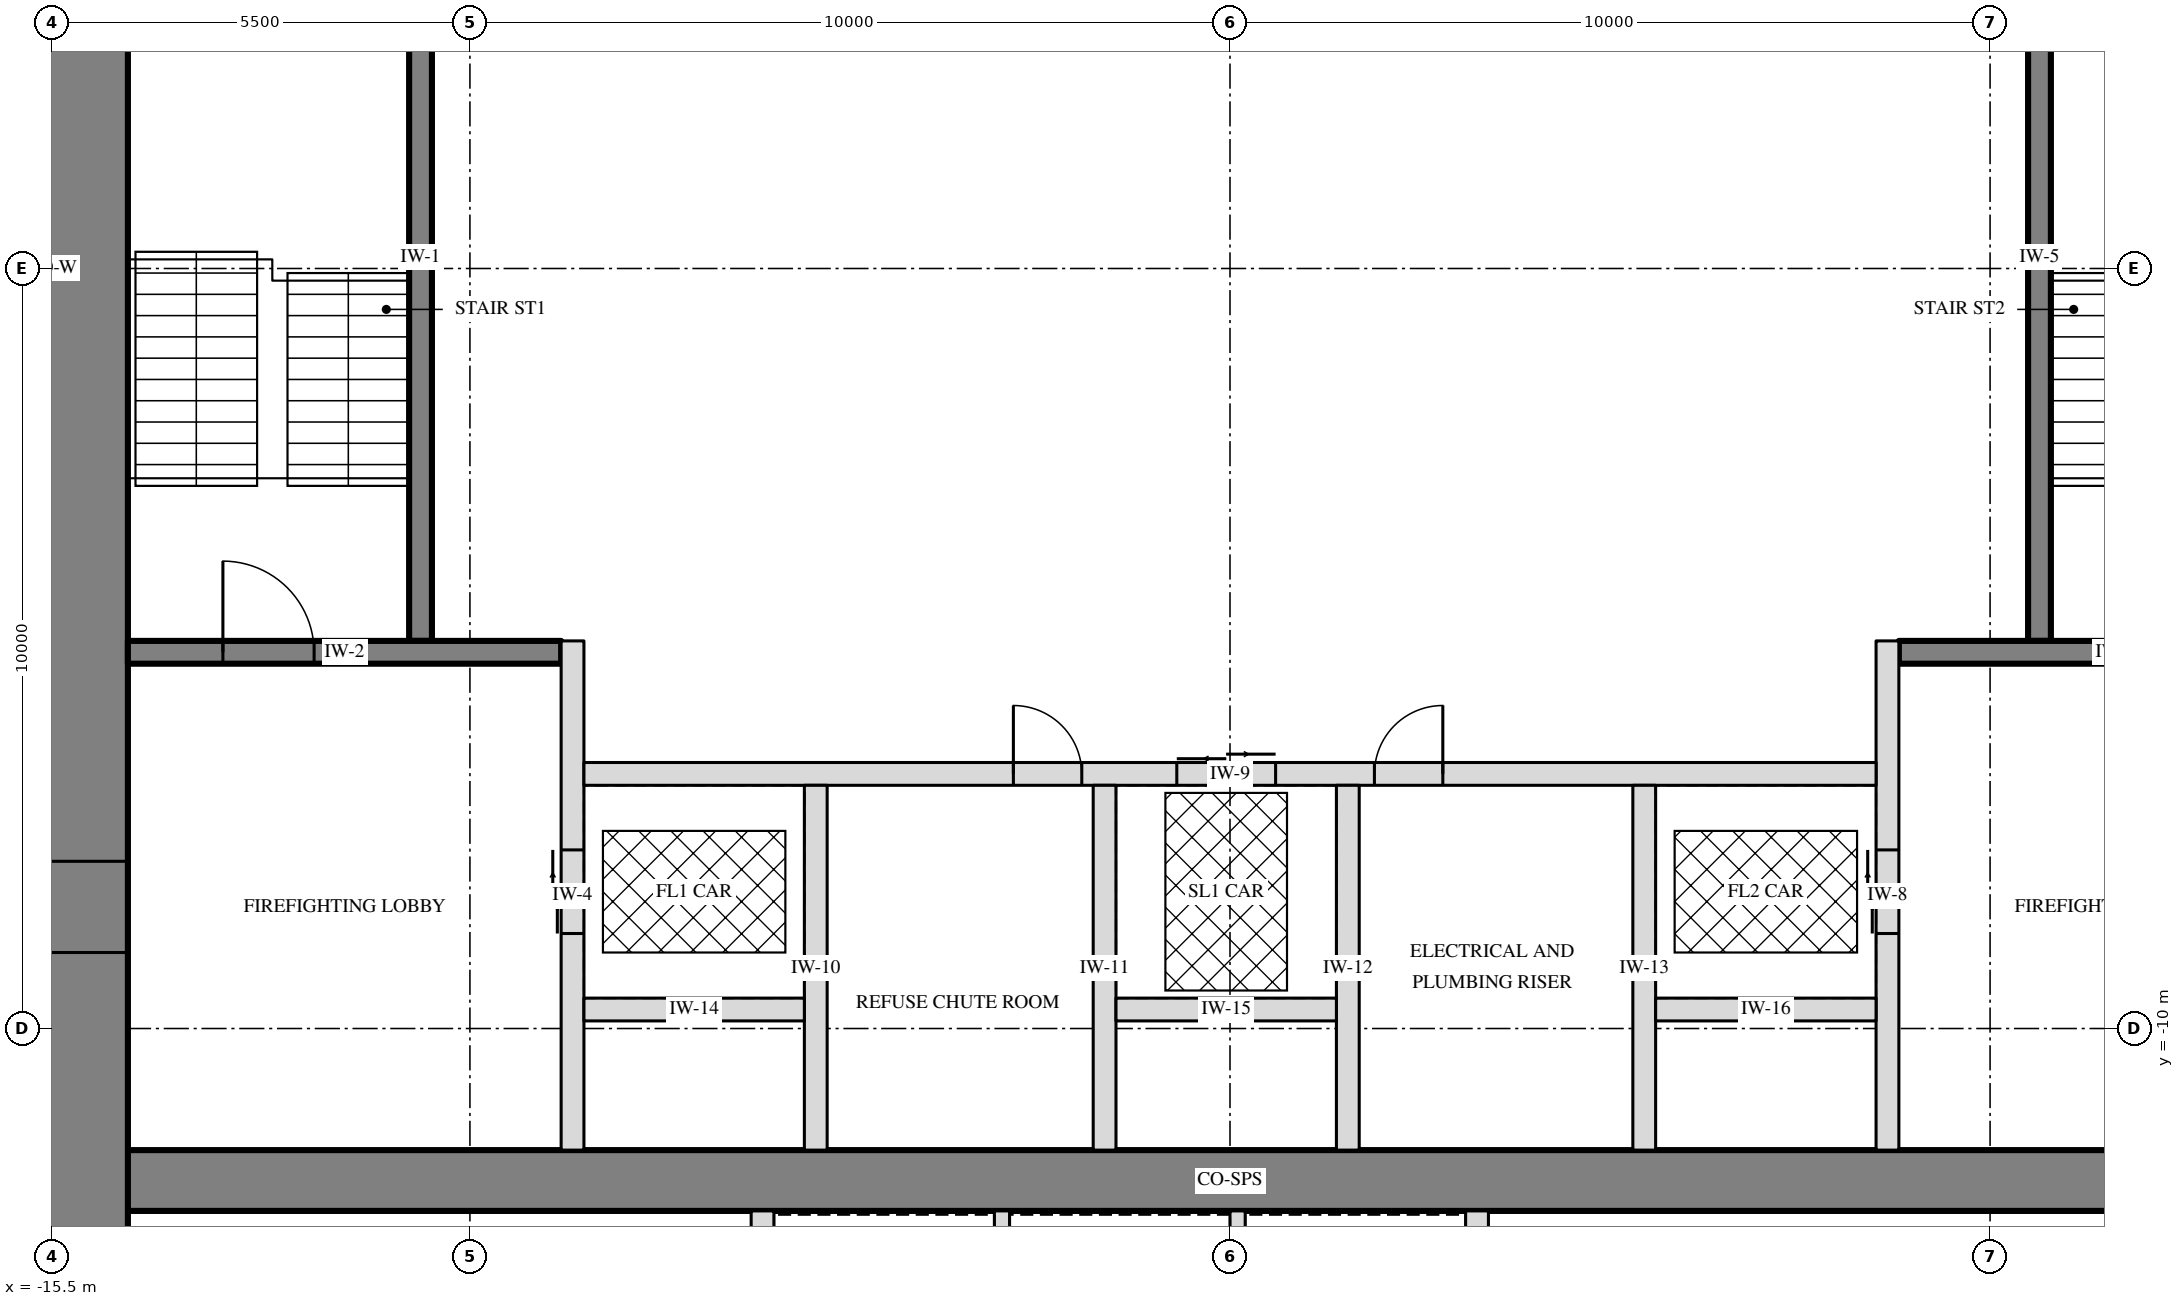
"""IFC4 building model, lengths in metres.
Left out: names, types, materials, properties, quantities, classifications, styles, units other than length and angle.
Written with IfcOpenShell. Run it as: python <this file> out.ifc"""

import sys

from ifc_helpers import new_model, si_unit, direction, frame, frame_2d, origin, place, context, subcontext, project, spatial, rectangle, extrude, element, fill, save


model = new_model("IFC4")
c1 = context("Model", 3, precision=1e-05, world=origin(), true_north=direction((0.0, 1.0)))
c2 = subcontext(c1, "Body", "Model", "MODEL_VIEW")
j1 = project(units=[si_unit("LENGTHUNIT", "METRE"), si_unit("PLANEANGLEUNIT", "RADIAN")], contexts=[c1])
p1 = place(None, origin())
s1 = spatial("IfcSite", under=j1, at=p1, CompositionType="ELEMENT")
p2 = place(p1, origin())
s2 = spatial("IfcBuilding", under=s1, at=p2, CompositionType="ELEMENT")
p3 = place(p2, frame((0.0, 0.0, 21.0)))
s3 = spatial("IfcBuildingStorey", under=s2, at=p3, CompositionType="ELEMENT", Elevation=21.0)
p4 = place(p3, frame((-15.5, -12.0, -0.25), z_axis=(0.0, 0.0, 1.0), x_axis=(1.0, 0.0, 0.0)))
e1 = element("IfcWall", 1, at=p4, inside=s3, PredefinedType="SHEAR", context=c2, shape_type="SweptSolid", body=[
    extrude(rectangle(XDim=31.0, YDim=0.8, at=frame_2d((15.5, 0.0))), origin(), (0.0, 0.0, 1.0), 3.75),
])
p5 = place(p3, frame((-15.5, -15.5, -0.25), z_axis=(0.0, 0.0, 1.0), x_axis=(0.0, 1.0, 0.0)))
e2 = element("IfcWall", 2, at=p5, inside=s3, PredefinedType="SHEAR", context=c2, shape_type="SweptSolid", body=[
    extrude(rectangle(XDim=31.0, YDim=2.0, at=frame_2d((15.5, 0.0))), origin(), (0.0, 0.0, 1.0), 3.75),
])
p6 = place(p5, frame((6.5, 0.0, 0.25)))
e3 = element("IfcOpeningElement", 3, at=p6, cuts=e2, PredefinedType="OPENING", context=c2, shape_type="SweptSolid", body=[
    extrude(rectangle(XDim=1.2, YDim=2.1, at=frame_2d((0.6, 1.05))), frame((0.0, 1.01, 0.0), z_axis=(0.0, -1.0, 0.0), x_axis=(1.0, 0.0, 0.0)), (0.0, 0.0, 1.0), 2.02),
])
p7 = place(p5, frame((23.0, 0.0, 0.25)))
e4 = element("IfcOpeningElement", 4, at=p7, cuts=e2, PredefinedType="OPENING", context=c2, shape_type="SweptSolid", body=[
    extrude(rectangle(XDim=1.8, YDim=2.1, at=frame_2d((0.9, 1.05))), frame((0.0, 1.01, 0.0), z_axis=(0.0, -1.0, 0.0), x_axis=(1.0, 0.0, 0.0)), (0.0, 0.0, 1.0), 2.02),
])
p8 = place(p3, frame((-10.65, -4.9, 0.0), z_axis=(0.0, 0.0, 1.0), x_axis=(0.0, 1.0, 0.0)))
e5 = element("IfcWall", 5, at=p8, inside=s3, PredefinedType="SOLIDWALL", context=c2, shape_type="SweptSolid", body=[
    extrude(rectangle(XDim=10.1, YDim=0.3, at=frame_2d((5.05, 0.0))), origin(), (0.0, 0.0, 1.0), 3.5),
])
p9 = place(p3, frame((-14.5, -5.05, 0.0), z_axis=(0.0, 0.0, 1.0), x_axis=(1.0, 0.0, 0.0)))
e6 = element("IfcWall", 6, at=p9, inside=s3, PredefinedType="SOLIDWALL", context=c2, shape_type="SweptSolid", body=[
    extrude(rectangle(XDim=5.7, YDim=0.3, at=frame_2d((2.85, 0.0))), origin(), (0.0, 0.0, 1.0), 3.5),
])
p10 = place(p9, frame((1.25, 0.0, 0.0)))
e7 = element("IfcOpeningElement", 7, at=p10, cuts=e6, PredefinedType="OPENING", context=c2, shape_type="SweptSolid", body=[
    extrude(rectangle(XDim=1.2, YDim=2.1, at=frame_2d((0.6, 1.05))), frame((0.0, 0.16, 0.0), z_axis=(0.0, -1.0, 0.0), x_axis=(1.0, 0.0, 0.0)), (0.0, 0.0, 1.0), 0.32),
])
p11 = place(p3, frame((-8.65, -11.6, 0.0), z_axis=(0.0, 0.0, 1.0), x_axis=(0.0, 1.0, 0.0)))
e8 = element("IfcWall", 8, at=p11, inside=s3, PredefinedType="PARTITIONING", context=c2, shape_type="SweptSolid", body=[
    extrude(rectangle(XDim=6.7, YDim=0.3, at=frame_2d((3.35, 0.0))), origin(), (0.0, 0.0, 1.0), 3.5),
])
p12 = place(p11, frame((2.85, 0.0, 0.0)))
e9 = element("IfcOpeningElement", 9, at=p12, cuts=e8, PredefinedType="OPENING", context=c2, shape_type="SweptSolid", body=[
    extrude(rectangle(XDim=1.1, YDim=2.1, at=frame_2d((0.55, 1.05))), frame((0.0, 0.16, 0.0), z_axis=(0.0, -1.0, 0.0), x_axis=(1.0, 0.0, 0.0)), (0.0, 0.0, 1.0), 0.32),
])
p13 = place(p3, frame((10.65, -4.9, 0.0), z_axis=(0.0, 0.0, 1.0), x_axis=(0.0, 1.0, 0.0)))
e10 = element("IfcWall", 10, at=p13, inside=s3, PredefinedType="SOLIDWALL", context=c2, shape_type="SweptSolid", body=[
    extrude(rectangle(XDim=10.1, YDim=0.3, at=frame_2d((5.05, 0.0))), origin(), (0.0, 0.0, 1.0), 3.5),
])
p14 = place(p3, frame((14.5, -5.05, 0.0), z_axis=(0.0, 0.0, 1.0), x_axis=(-1.0, 0.0, 0.0)))
e11 = element("IfcWall", 11, at=p14, inside=s3, PredefinedType="SOLIDWALL", context=c2, shape_type="SweptSolid", body=[
    extrude(rectangle(XDim=5.7, YDim=0.3, at=frame_2d((2.85, 0.0))), origin(), (0.0, 0.0, 1.0), 3.5),
])
p15 = place(p14, frame((1.25, 0.0, 0.0)))
e12 = element("IfcOpeningElement", 12, at=p15, cuts=e11, PredefinedType="OPENING", context=c2, shape_type="SweptSolid", body=[
    extrude(rectangle(XDim=1.2, YDim=2.1, at=frame_2d((0.6, 1.05))), frame((0.0, 0.16, 0.0), z_axis=(0.0, -1.0, 0.0), x_axis=(1.0, 0.0, 0.0)), (0.0, 0.0, 1.0), 0.32),
])
p16 = place(p3, frame((8.65, -11.6, 0.0), z_axis=(0.0, 0.0, 1.0), x_axis=(0.0, 1.0, 0.0)))
e13 = element("IfcWall", 13, at=p16, inside=s3, PredefinedType="PARTITIONING", context=c2, shape_type="SweptSolid", body=[
    extrude(rectangle(XDim=6.7, YDim=0.3, at=frame_2d((3.35, 0.0))), origin(), (0.0, 0.0, 1.0), 3.5),
])
p17 = place(p16, frame((2.85, 0.0, 0.0)))
e14 = element("IfcOpeningElement", 14, at=p17, cuts=e13, PredefinedType="OPENING", context=c2, shape_type="SweptSolid", body=[
    extrude(rectangle(XDim=1.1, YDim=2.1, at=frame_2d((0.55, 1.05))), frame((0.0, 0.16, 0.0), z_axis=(0.0, -1.0, 0.0), x_axis=(1.0, 0.0, 0.0)), (0.0, 0.0, 1.0), 0.32),
])
p18 = place(p3, frame((-8.5, -6.65, 0.0), z_axis=(0.0, 0.0, 1.0), x_axis=(1.0, 0.0, 0.0)))
e15 = element("IfcWall", 15, at=p18, inside=s3, PredefinedType="PARTITIONING", context=c2, shape_type="SweptSolid", body=[
    extrude(rectangle(XDim=17.0, YDim=0.3, at=frame_2d((8.5, 0.0))), origin(), (0.0, 0.0, 1.0), 3.5),
])
p19 = place(p18, frame((7.8, 0.0, 0.0)))
e16 = element("IfcOpeningElement", 16, at=p19, cuts=e15, PredefinedType="OPENING", context=c2, shape_type="SweptSolid", body=[
    extrude(rectangle(XDim=1.3, YDim=2.4, at=frame_2d((0.65, 1.2))), frame((0.0, 0.16, 0.0), z_axis=(0.0, -1.0, 0.0), x_axis=(1.0, 0.0, 0.0)), (0.0, 0.0, 1.0), 0.32),
])
p20 = place(p18, frame((5.65, 0.0, 0.0)))
e17 = element("IfcOpeningElement", 17, at=p20, cuts=e15, PredefinedType="OPENING", context=c2, shape_type="SweptSolid", body=[
    extrude(rectangle(XDim=0.9, YDim=2.1, at=frame_2d((0.45, 1.05))), frame((0.0, 0.16, 0.0), z_axis=(0.0, -1.0, 0.0), x_axis=(1.0, 0.0, 0.0)), (0.0, 0.0, 1.0), 0.32),
])
p21 = place(p18, frame((10.4, 0.0, 0.0)))
e18 = element("IfcOpeningElement", 18, at=p21, cuts=e15, PredefinedType="OPENING", context=c2, shape_type="SweptSolid", body=[
    extrude(rectangle(XDim=0.9, YDim=2.1, at=frame_2d((0.45, 1.05))), frame((0.0, 0.16, 0.0), z_axis=(0.0, -1.0, 0.0), x_axis=(1.0, 0.0, 0.0)), (0.0, 0.0, 1.0), 0.32),
])
for number, where, z_axis, x_axis in (
    (19, (-5.45, -11.6, 0.0), (0.0, 0.0, 1.0), (0.0, 1.0, 0.0)),
    (20, (-1.65, -11.6, 0.0), (0.0, 0.0, 1.0), (0.0, 1.0, 0.0)),
    (21, (1.55, -11.6, 0.0), (0.0, 0.0, 1.0), (0.0, 1.0, 0.0)),
    (22, (5.45, -11.6, 0.0), (0.0, 0.0, 1.0), (0.0, 1.0, 0.0)),
):
    element("IfcWall", number, at=place(p3, frame(where, z_axis=z_axis, x_axis=x_axis)), inside=s3, PredefinedType="PARTITIONING", context=c2, shape_type="SweptSolid", body=[
        extrude(rectangle(XDim=4.8, YDim=0.3, at=frame_2d((2.4, 0.0))), origin(), (0.0, 0.0, 1.0), 3.5),
    ])
for number, where, z_axis, x_axis in (
    (23, (-8.5, -9.75, 0.0), (0.0, 0.0, 1.0), (1.0, 0.0, 0.0)),
    (24, (-1.5, -9.75, 0.0), (0.0, 0.0, 1.0), (1.0, 0.0, 0.0)),
    (25, (5.6, -9.75, 0.0), (0.0, 0.0, 1.0), (1.0, 0.0, 0.0)),
):
    element("IfcWall", number, at=place(p3, frame(where, z_axis=z_axis, x_axis=x_axis)), inside=s3, PredefinedType="PARTITIONING", context=c2, shape_type="SweptSolid", body=[
        extrude(rectangle(XDim=2.9, YDim=0.3, at=frame_2d((1.45, 0.0))), origin(), (0.0, 0.0, 1.0), 3.5),
    ])
for number, where, z_axis, x_axis in (
    (26, (-6.15, -14.5, 0.0), (0.0, 0.0, 1.0), (0.0, 1.0, 0.0)),
    (27, (3.25, -14.5, 0.0), (0.0, 0.0, 1.0), (0.0, 1.0, 0.0)),
):
    element("IfcWall", number, at=place(p3, frame(where, z_axis=z_axis, x_axis=x_axis)), inside=s3, PredefinedType="PARTITIONING", context=c2, shape_type="SweptSolid", body=[
        extrude(rectangle(XDim=2.1, YDim=0.3, at=frame_2d((1.05, 0.0))), origin(), (0.0, 0.0, 1.0), 3.5),
    ])
for number, where, z_axis, x_axis in (
    (28, (-3.0, -14.5, 0.0), (0.0, 0.0, 1.0), (0.0, 1.0, 0.0)),
    (29, (0.1, -14.5, 0.0), (0.0, 0.0, 1.0), (0.0, 1.0, 0.0)),
):
    element("IfcWall", number, at=place(p3, frame(where, z_axis=z_axis, x_axis=x_axis)), inside=s3, PredefinedType="PARTITIONING", context=c2, shape_type="SweptSolid", body=[
        extrude(rectangle(XDim=2.1, YDim=0.2, at=frame_2d((1.05, 0.0))), origin(), (0.0, 0.0, 1.0), 3.5),
    ])
p22 = place(p3, frame((-10.65, 2.0, 0.0), z_axis=(0.0, 0.0, 1.0), x_axis=(1.0, 0.0, 0.0)))
e30 = element("IfcWall", 30, at=p22, inside=s3, PredefinedType="PARTITIONING", context=c2, shape_type="SweptSolid", body=[
    extrude(rectangle(XDim=21.3, YDim=0.3, at=frame_2d((10.65, 0.0))), origin(), (0.0, 0.0, 1.0), 3.5),
])
p23 = place(p22, frame((10.05, 0.0, 0.0)))
e31 = element("IfcOpeningElement", 31, at=p23, cuts=e30, PredefinedType="OPENING", context=c2, shape_type="SweptSolid", body=[
    extrude(rectangle(XDim=1.2, YDim=2.1, at=frame_2d((0.6, 1.05))), frame((0.0, 0.16, 0.0), z_axis=(0.0, -1.0, 0.0), x_axis=(1.0, 0.0, 0.0)), (0.0, 0.0, 1.0), 0.32),
])
p24 = place(p22, frame((18.942, 0.0, 0.0)))
e32 = element("IfcOpeningElement", 32, at=p24, cuts=e30, PredefinedType="OPENING", context=c2, shape_type="SweptSolid", body=[
    extrude(rectangle(XDim=0.9, YDim=2.1, at=frame_2d((0.45, 1.05))), frame((0.0, 0.16, 0.0), z_axis=(0.0, -1.0, 0.0), x_axis=(1.0, 0.0, 0.0)), (0.0, 0.0, 1.0), 0.32),
])
p25 = place(p3, frame((-3.3, -6.65, 0.0), z_axis=(0.0, 0.0, 1.0), x_axis=(0.0, 1.0, 0.0)))
e33 = element("IfcWall", 33, at=p25, inside=s3, PredefinedType="PARTITIONING", context=c2, shape_type="SweptSolid", body=[
    extrude(rectangle(XDim=8.65, YDim=0.3, at=frame_2d((4.325, 0.0))), origin(), (0.0, 0.0, 1.0), 3.5),
])
p26 = place(p25, frame((1.75, 0.0, 0.0)))
e34 = element("IfcOpeningElement", 34, at=p26, cuts=e33, PredefinedType="OPENING", context=c2, shape_type="SweptSolid", body=[
    extrude(rectangle(XDim=0.9, YDim=2.1, at=frame_2d((0.45, 1.05))), frame((0.0, 0.16, 0.0), z_axis=(0.0, -1.0, 0.0), x_axis=(1.0, 0.0, 0.0)), (0.0, 0.0, 1.0), 0.32),
])
p27 = place(p25, frame((6.075, 0.0, 0.0)))
e35 = element("IfcOpeningElement", 35, at=p27, cuts=e33, PredefinedType="OPENING", context=c2, shape_type="SweptSolid", body=[
    extrude(rectangle(XDim=0.9, YDim=2.1, at=frame_2d((0.45, 1.05))), frame((0.0, 0.16, 0.0), z_axis=(0.0, -1.0, 0.0), x_axis=(1.0, 0.0, 0.0)), (0.0, 0.0, 1.0), 0.32),
])
p28 = place(p3, frame((3.3, -6.65, 0.0), z_axis=(0.0, 0.0, 1.0), x_axis=(0.0, 1.0, 0.0)))
e36 = element("IfcWall", 36, at=p28, inside=s3, PredefinedType="PARTITIONING", context=c2, shape_type="SweptSolid", body=[
    extrude(rectangle(XDim=8.65, YDim=0.3, at=frame_2d((4.325, 0.0))), origin(), (0.0, 0.0, 1.0), 3.5),
])
p29 = place(p28, frame((3.875, 0.0, 0.0)))
e37 = element("IfcOpeningElement", 37, at=p29, cuts=e36, PredefinedType="OPENING", context=c2, shape_type="SweptSolid", body=[
    extrude(rectangle(XDim=0.9, YDim=2.1, at=frame_2d((0.45, 1.05))), frame((0.0, 0.16, 0.0), z_axis=(0.0, -1.0, 0.0), x_axis=(1.0, 0.0, 0.0)), (0.0, 0.0, 1.0), 0.32),
])
p30 = place(p3, frame((-10.65, -2.25, 0.0), z_axis=(0.0, 0.0, 1.0), x_axis=(1.0, 0.0, 0.0)))
e38 = element("IfcWall", 38, at=p30, inside=s3, PredefinedType="PARTITIONING", context=c2, shape_type="SweptSolid", body=[
    extrude(rectangle(XDim=7.35, YDim=0.3, at=frame_2d((3.675, 0.0))), origin(), (0.0, 0.0, 1.0), 3.5),
])
p31 = place(p3, frame((6.834, -6.65, 0.0), z_axis=(0.0, 0.0, 1.0), x_axis=(0.0, 1.0, 0.0)))
e39 = element("IfcWall", 39, at=p31, inside=s3, PredefinedType="PARTITIONING", context=c2, shape_type="SweptSolid", body=[
    extrude(rectangle(XDim=8.65, YDim=0.3, at=frame_2d((4.325, 0.0))), origin(), (0.0, 0.0, 1.0), 3.5),
])
p32 = place(p10, origin())
e40 = element("IfcDoor", 40, at=p32, inside=s3, OperationType="SINGLE_SWING_LEFT", PredefinedType="DOOR", context=c2, shape_type="SweptSolid", body=[
    extrude(rectangle(XDim=1.2, YDim=2.1, at=frame_2d((0.6, 1.05))), frame((0.0, 0.025, 0.0), z_axis=(0.0, -1.0, 0.0), x_axis=(1.0, 0.0, 0.0)), (0.0, 0.0, 1.0), 0.05),
])
fill(e7, e40)
p33 = place(p6, origin())
e41 = element("IfcDoor", 41, at=p33, inside=s3, OperationType="SINGLE_SWING_LEFT", PredefinedType="DOOR", context=c2, shape_type="SweptSolid", body=[
    extrude(rectangle(XDim=1.2, YDim=2.1, at=frame_2d((0.6, 1.05))), frame((0.0, 0.025, 0.0), z_axis=(0.0, -1.0, 0.0), x_axis=(1.0, 0.0, 0.0)), (0.0, 0.0, 1.0), 0.05),
])
fill(e3, e41)
p34 = place(p12, origin())
e42 = element("IfcDoor", 42, at=p34, inside=s3, OperationType="DOUBLE_DOOR_SLIDING", PredefinedType="DOOR", context=c2, shape_type="SweptSolid", body=[
    extrude(rectangle(XDim=1.1, YDim=2.1, at=frame_2d((0.55, 1.05))), frame((0.0, 0.025, 0.0), z_axis=(0.0, -1.0, 0.0), x_axis=(1.0, 0.0, 0.0)), (0.0, 0.0, 1.0), 0.05),
])
fill(e9, e42)
p35 = place(p17, origin())
e43 = element("IfcDoor", 43, at=p35, inside=s3, OperationType="DOUBLE_DOOR_SLIDING", PredefinedType="DOOR", context=c2, shape_type="SweptSolid", body=[
    extrude(rectangle(XDim=1.1, YDim=2.1, at=frame_2d((0.55, 1.05))), frame((0.0, 0.025, 0.0), z_axis=(0.0, -1.0, 0.0), x_axis=(1.0, 0.0, 0.0)), (0.0, 0.0, 1.0), 0.05),
])
fill(e14, e43)
p36 = place(p19, origin())
e44 = element("IfcDoor", 44, at=p36, inside=s3, OperationType="DOUBLE_DOOR_SLIDING", PredefinedType="DOOR", context=c2, shape_type="SweptSolid", body=[
    extrude(rectangle(XDim=1.3, YDim=2.4, at=frame_2d((0.65, 1.2))), frame((0.0, 0.025, 0.0), z_axis=(0.0, -1.0, 0.0), x_axis=(1.0, 0.0, 0.0)), (0.0, 0.0, 1.0), 0.05),
])
fill(e16, e44)
p37 = place(p23, origin())
e45 = element("IfcDoor", 45, at=p37, inside=s3, OperationType="SINGLE_SWING_LEFT", PredefinedType="DOOR", context=c2, shape_type="SweptSolid", body=[
    extrude(rectangle(XDim=1.2, YDim=2.1, at=frame_2d((0.6, 1.05))), frame((0.0, 0.025, 0.0), z_axis=(0.0, -1.0, 0.0), x_axis=(1.0, 0.0, 0.0)), (0.0, 0.0, 1.0), 0.05),
])
fill(e31, e45)
p38 = place(p20, origin())
e46 = element("IfcDoor", 46, at=p38, inside=s3, OperationType="SINGLE_SWING_LEFT", PredefinedType="DOOR", context=c2, shape_type="SweptSolid", body=[
    extrude(rectangle(XDim=0.9, YDim=2.1, at=frame_2d((0.45, 1.05))), frame((0.0, 0.025, 0.0), z_axis=(0.0, -1.0, 0.0), x_axis=(1.0, 0.0, 0.0)), (0.0, 0.0, 1.0), 0.05),
])
fill(e17, e46)
p39 = place(p21, origin())
e47 = element("IfcDoor", 47, at=p39, inside=s3, OperationType="SINGLE_SWING_RIGHT", PredefinedType="DOOR", context=c2, shape_type="SweptSolid", body=[
    extrude(rectangle(XDim=0.9, YDim=2.1, at=frame_2d((0.45, 1.05))), frame((0.0, 0.025, 0.0), z_axis=(0.0, -1.0, 0.0), x_axis=(1.0, 0.0, 0.0)), (0.0, 0.0, 1.0), 0.05),
])
fill(e18, e47)
p40 = place(p26, origin())
e48 = element("IfcDoor", 48, at=p40, inside=s3, OperationType="SINGLE_SWING_LEFT", PredefinedType="DOOR", context=c2, shape_type="SweptSolid", body=[
    extrude(rectangle(XDim=0.9, YDim=2.1, at=frame_2d((0.45, 1.05))), frame((0.0, 0.025, 0.0), z_axis=(0.0, -1.0, 0.0), x_axis=(1.0, 0.0, 0.0)), (0.0, 0.0, 1.0), 0.05),
])
fill(e34, e48)
p41 = place(p27, origin())
e49 = element("IfcDoor", 49, at=p41, inside=s3, OperationType="SINGLE_SWING_LEFT", PredefinedType="DOOR", context=c2, shape_type="SweptSolid", body=[
    extrude(rectangle(XDim=0.9, YDim=2.1, at=frame_2d((0.45, 1.05))), frame((0.0, 0.025, 0.0), z_axis=(0.0, -1.0, 0.0), x_axis=(1.0, 0.0, 0.0)), (0.0, 0.0, 1.0), 0.05),
])
fill(e35, e49)
p42 = place(p29, origin())
e50 = element("IfcDoor", 50, at=p42, inside=s3, OperationType="SINGLE_SWING_LEFT", PredefinedType="DOOR", context=c2, shape_type="SweptSolid", body=[
    extrude(rectangle(XDim=0.9, YDim=2.1, at=frame_2d((0.45, 1.05))), frame((0.0, 0.025, 0.0), z_axis=(0.0, -1.0, 0.0), x_axis=(1.0, 0.0, 0.0)), (0.0, 0.0, 1.0), 0.05),
])
fill(e37, e50)
p43 = place(p24, origin())
e51 = element("IfcDoor", 51, at=p43, inside=s3, OperationType="SINGLE_SWING_RIGHT", PredefinedType="DOOR", context=c2, shape_type="SweptSolid", body=[
    extrude(rectangle(XDim=0.9, YDim=2.1, at=frame_2d((0.45, 1.05))), frame((0.0, 0.025, 0.0), z_axis=(0.0, -1.0, 0.0), x_axis=(1.0, 0.0, 0.0)), (0.0, 0.0, 1.0), 0.05),
])
fill(e32, e51)
save(model, sys.argv[1])
